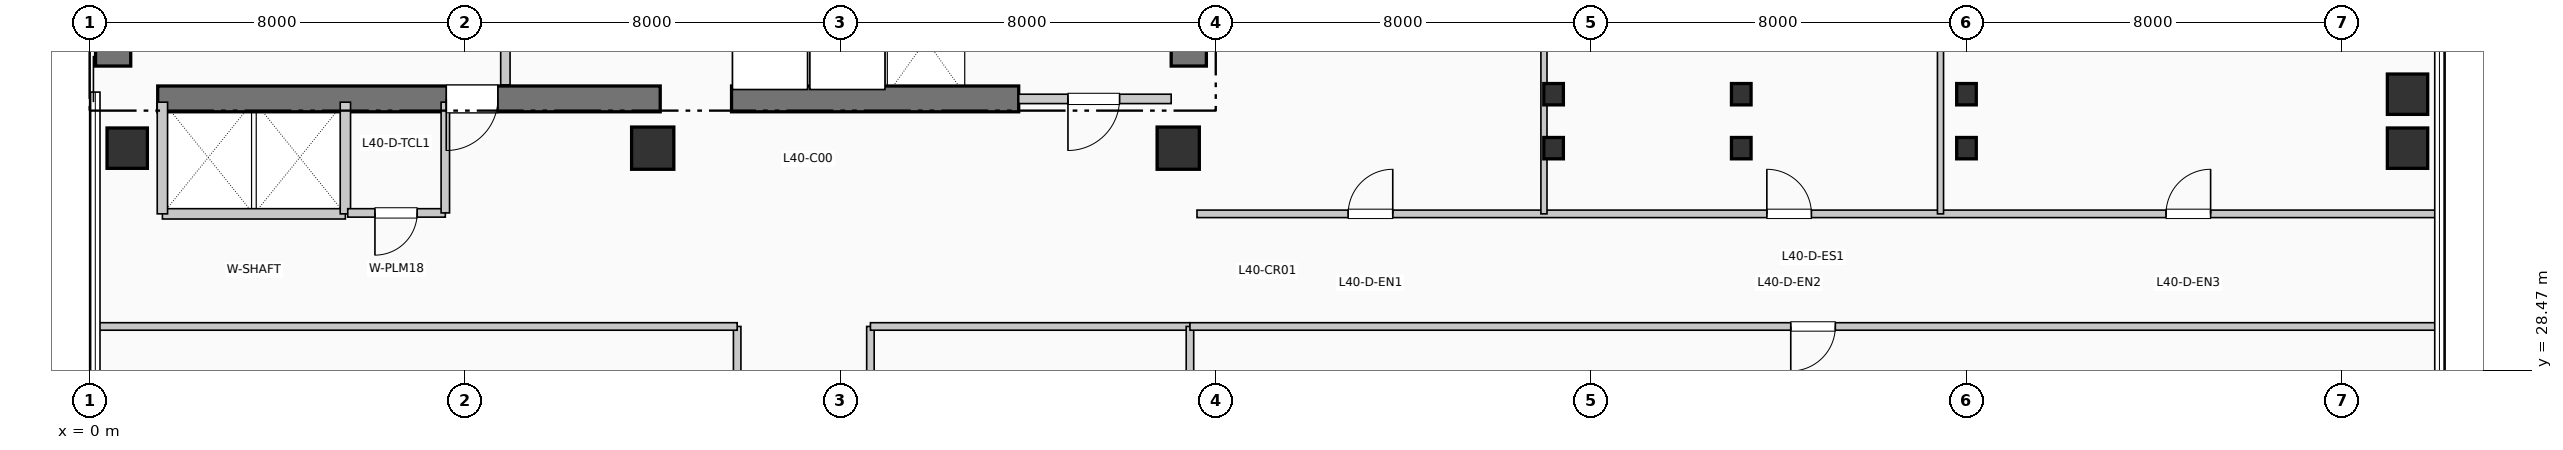
"""IFC4 building model, lengths in metres.
Left out: names, types, materials, properties, quantities, classifications, styles, units other than length and angle.
Written with IfcOpenShell. Run it as: python <this file> out.ifc"""

import sys

from ifc_helpers import new_model, si_unit, direction, frame, frame_2d, origin, origin_2d, place, context, subcontext, project, spatial, rectangle, i_section, extrude, element, fill, save


model = new_model("IFC4")
c1 = context("Model", 3, precision=1e-05, world=origin(), true_north=direction((0.0, 1.0)))
c2 = subcontext(c1, "Body", "Model", "MODEL_VIEW")
j1 = project(units=[si_unit("LENGTHUNIT", "METRE"), si_unit("PLANEANGLEUNIT", "RADIAN")], contexts=[c1])
p1 = place(None, origin())
s1 = spatial("IfcSite", under=j1, at=p1, CompositionType="ELEMENT")
p2 = place(p1, origin())
s2 = spatial("IfcBuilding", under=s1, at=p2, CompositionType="ELEMENT")
p3 = place(p2, frame((0.0, 0.0, 166.65)))
s3 = spatial("IfcBuildingStorey", under=s2, at=p3, CompositionType="ELEMENT", Elevation=166.65)
p4 = place(p3, frame((0.5, 34.95, 0.0), z_axis=(0.0, 0.0, 1.0), x_axis=(0.0, 1.0, 0.0)))
e1 = element("IfcWall", 1, at=p4, inside=s3, PredefinedType="SHEAR", context=c2, shape_type="SweptSolid", body=[
    extrude(rectangle(XDim=7.9, YDim=0.75, at=frame_2d((3.95, 0.0))), origin(), (0.0, 0.0, 1.0), 3.96),
])
p5 = place(p3, frame((23.425, 34.95, 0.0), z_axis=(0.0, 0.0, 1.0), x_axis=(0.0, 1.0, 0.0)))
e2 = element("IfcWall", 2, at=p5, inside=s3, PredefinedType="SHEAR", context=c2, shape_type="SweptSolid", body=[
    extrude(rectangle(XDim=10.64, YDim=0.75, at=frame_2d((5.32, 0.0))), origin(), (0.0, 0.0, 1.0), 3.96),
])
p6 = place(p3, frame((1.45, 34.25, 0.0), z_axis=(0.0, 0.0, 1.0), x_axis=(1.0, 0.0, 0.0)))
e3 = element("IfcWall", 3, at=p6, inside=s3, PredefinedType="SHEAR", context=c2, shape_type="SweptSolid", body=[
    extrude(rectangle(XDim=10.71, YDim=0.55, at=frame_2d((5.355, 0.0))), origin(), (0.0, 0.0, 1.0), 3.96),
])
p7 = place(p6, frame((7.25, 0.0, 0.0), z_axis=(0.0, 0.0, 1.0), x_axis=(-1.0, 0.0, 0.0)))
e4 = element("IfcOpeningElement", 4, at=p7, cuts=e3, PredefinedType="OPENING", context=c2, shape_type="SweptSolid", body=[
    extrude(rectangle(XDim=1.1, YDim=2.15, at=frame_2d((0.55, 1.075))), frame((0.0, 0.285, 0.0), z_axis=(0.0, -1.0, 0.0), x_axis=(1.0, 0.0, 0.0)), (0.0, 0.0, 1.0), 0.57),
])
p8 = place(p3, frame((13.68, 34.25, 0.0), z_axis=(0.0, 0.0, 1.0), x_axis=(1.0, 0.0, 0.0)))
e5 = element("IfcWall", 5, at=p8, inside=s3, PredefinedType="SHEAR", context=c2, shape_type="SweptSolid", body=[
    extrude(rectangle(XDim=6.12, YDim=0.55, at=frame_2d((3.06, 0.0))), origin(), (0.0, 0.0, 1.0), 3.96),
])
p9 = place(p3, frame((0.8, 33.2, 0.0), z_axis=(0.0, 0.0, 1.0), x_axis=(1.0, 0.0, 0.0)))
e6 = element("IfcColumn", 6, at=p9, inside=s3, PredefinedType="COLUMN", context=c2, shape_type="SweptSolid", body=[
    extrude(rectangle(XDim=0.86, YDim=0.86, at=origin_2d()), origin(), (0.0, 0.0, 1.0), 3.96),
])
for number, where, z_axis, x_axis in (
    (7, (12.0, 33.2, 0.0), (0.0, 0.0, 1.0), (1.0, 0.0, 0.0)),
    (8, (23.2, 33.2, 0.0), (0.0, 0.0, 1.0), (1.0, 0.0, 0.0)),
):
    element("IfcColumn", number, at=place(p3, frame(where, z_axis=z_axis, x_axis=x_axis)), inside=s3, PredefinedType="COLUMN", context=c2, shape_type="SweptSolid", body=[
        extrude(rectangle(XDim=0.9, YDim=0.9, at=origin_2d()), origin(), (0.0, 0.0, 1.0), 3.96),
    ])
for number, where, z_axis, x_axis in (
    (9, (31.2, 33.2, 0.0), (0.0, 0.0, 1.0), (1.0, 0.0, 0.0)),
    (10, (31.2, 34.35, 0.0), (0.0, 0.0, 1.0), (1.0, 0.0, 0.0)),
    (11, (35.2, 33.2, 0.0), (0.0, 0.0, 1.0), (1.0, 0.0, 0.0)),
    (12, (35.2, 34.35, 0.0), (0.0, 0.0, 1.0), (1.0, 0.0, 0.0)),
    (13, (40.0, 33.2, 0.0), (0.0, 0.0, 1.0), (1.0, 0.0, 0.0)),
    (14, (40.0, 34.35, 0.0), (0.0, 0.0, 1.0), (1.0, 0.0, 0.0)),
):
    element("IfcColumn", number, at=place(p3, frame(where, z_axis=z_axis, x_axis=x_axis)), inside=s3, PredefinedType="COLUMN", context=c2, shape_type="SweptSolid", body=[
        extrude(i_section(OverallWidth=0.418, OverallDepth=0.455, WebThickness=0.032, FlangeThickness=0.051, at=origin_2d()), origin(), (0.0, 0.0, 1.0), 3.96),
    ])
for number, where, z_axis, x_axis in (
    (15, (49.4, 33.2, 0.0), (0.0, 0.0, 1.0), (1.0, 0.0, 0.0)),
    (16, (49.4, 34.35, 0.0), (0.0, 0.0, 1.0), (1.0, 0.0, 0.0)),
):
    element("IfcColumn", number, at=place(p3, frame(where, z_axis=z_axis, x_axis=x_axis)), inside=s3, PredefinedType="COLUMN", context=c2, shape_type="SweptSolid", body=[
        extrude(rectangle(XDim=0.86, YDim=0.86, at=origin_2d()), origin(), (0.0, 0.0, 1.0), 3.96),
    ])
p10 = place(p3, frame((8.86, 34.55, 0.0), z_axis=(0.0, 0.0, 1.0), x_axis=(0.0, 1.0, 0.0)))
e17 = element("IfcWall", 17, at=p10, inside=s3, PredefinedType="PARTITIONING", context=c2, shape_type="SweptSolid", body=[
    extrude(rectangle(XDim=2.5, YDim=0.2, at=frame_2d((1.25, 0.0))), origin(), (0.0, 0.0, 1.0), 3.71),
])
p11 = place(p3, frame((19.8, 34.25, 0.0), z_axis=(0.0, 0.0, 1.0), x_axis=(1.0, 0.0, 0.0)))
e18 = element("IfcWall", 18, at=p11, inside=s3, PredefinedType="PARTITIONING", context=c2, shape_type="SweptSolid", body=[
    extrude(rectangle(XDim=3.25, YDim=0.2, at=frame_2d((1.625, 0.0))), origin(), (0.0, 0.0, 1.0), 3.71),
])
p12 = place(p11, frame((2.15, 0.0, 0.0), z_axis=(0.0, 0.0, 1.0), x_axis=(-1.0, 0.0, 0.0)))
e19 = element("IfcOpeningElement", 19, at=p12, cuts=e18, PredefinedType="OPENING", context=c2, shape_type="SweptSolid", body=[
    extrude(rectangle(XDim=1.1, YDim=2.15, at=frame_2d((0.55, 1.075))), frame((0.0, 0.11, 0.0), z_axis=(0.0, -1.0, 0.0), x_axis=(1.0, 0.0, 0.0)), (0.0, 0.0, 1.0), 0.22),
])
p13 = place(p3, frame((1.55, 31.8, 0.0), z_axis=(0.0, 0.0, 1.0), x_axis=(1.0, 0.0, 0.0)))
e20 = element("IfcWall", 20, at=p13, inside=s3, PredefinedType="PARTITIONING", context=c2, shape_type="SweptSolid", body=[
    extrude(rectangle(XDim=3.9, YDim=0.22, at=frame_2d((1.95, 0.0))), origin(), (0.0, 0.0, 1.0), 3.71),
])
for number, where, z_axis, x_axis in (
    (21, (1.55, 31.8, 0.0), (0.0, 0.0, 1.0), (0.0, 1.0, 0.0)),
    (22, (5.45, 31.8, 0.0), (0.0, 0.0, 1.0), (0.0, 1.0, 0.0)),
):
    element("IfcWall", number, at=place(p3, frame(where, z_axis=z_axis, x_axis=x_axis)), inside=s3, PredefinedType="PARTITIONING", context=c2, shape_type="SweptSolid", body=[
        extrude(rectangle(XDim=2.38, YDim=0.22, at=frame_2d((1.19, 0.0))), origin(), (0.0, 0.0, 1.0), 3.71),
    ])
p14 = place(p3, frame((5.5, 31.82, 0.0), z_axis=(0.0, 0.0, 1.0), x_axis=(1.0, 0.0, 0.0)))
e23 = element("IfcWall", 23, at=p14, inside=s3, PredefinedType="PLUMBINGWALL", context=c2, shape_type="SweptSolid", body=[
    extrude(rectangle(XDim=2.08, YDim=0.18, at=frame_2d((1.04, 0.0))), origin(), (0.0, 0.0, 1.0), 3.71),
])
p15 = place(p14, frame((1.48, 0.0, 0.0), z_axis=(0.0, 0.0, 1.0), x_axis=(-1.0, 0.0, 0.0)))
e24 = element("IfcOpeningElement", 24, at=p15, cuts=e23, PredefinedType="OPENING", context=c2, shape_type="SweptSolid", body=[
    extrude(rectangle(XDim=0.9, YDim=2.1, at=frame_2d((0.45, 1.05))), frame((0.0, 0.1, 0.0), z_axis=(0.0, -1.0, 0.0), x_axis=(1.0, 0.0, 0.0)), (0.0, 0.0, 1.0), 0.2),
])
p16 = place(p3, frame((7.58, 31.82, 0.0), z_axis=(0.0, 0.0, 1.0), x_axis=(0.0, 1.0, 0.0)))
e25 = element("IfcWall", 25, at=p16, inside=s3, PredefinedType="PLUMBINGWALL", context=c2, shape_type="SweptSolid", body=[
    extrude(rectangle(XDim=2.36, YDim=0.18, at=frame_2d((1.18, 0.0))), origin(), (0.0, 0.0, 1.0), 3.71),
])
p17 = place(p3, frame((13.8, 7.2, 0.0), z_axis=(0.0, 0.0, 1.0), x_axis=(0.0, 1.0, 0.0)))
e26 = element("IfcWall", 26, at=p17, inside=s3, PredefinedType="PARTITIONING", context=c2, shape_type="SweptSolid", body=[
    extrude(rectangle(XDim=22.2, YDim=0.16, at=frame_2d((11.1, 0.0))), origin(), (0.0, 0.0, 1.0), 3.71),
])
p18 = place(p17, frame((4.36, 0.0, 0.0), z_axis=(0.0, 0.0, 1.0), x_axis=(-1.0, 0.0, 0.0)))
e27 = element("IfcOpeningElement", 27, at=p18, cuts=e26, PredefinedType="OPENING", context=c2, shape_type="SweptSolid", body=[
    extrude(rectangle(XDim=0.95, YDim=2.15, at=frame_2d((0.475, 1.075))), frame((0.0, 0.09, 0.0), z_axis=(0.0, -1.0, 0.0), x_axis=(1.0, 0.0, 0.0)), (0.0, 0.0, 1.0), 0.18),
])
p19 = place(p17, frame((12.13, 0.0, 0.0), z_axis=(0.0, 0.0, 1.0), x_axis=(-1.0, 0.0, 0.0)))
e28 = element("IfcOpeningElement", 28, at=p19, cuts=e26, PredefinedType="OPENING", context=c2, shape_type="SweptSolid", body=[
    extrude(rectangle(XDim=0.95, YDim=2.15, at=frame_2d((0.475, 1.075))), frame((0.0, 0.09, 0.0), z_axis=(0.0, -1.0, 0.0), x_axis=(1.0, 0.0, 0.0)), (0.0, 0.0, 1.0), 0.18),
])
p20 = place(p17, frame((19.345, 0.0, 0.0), z_axis=(0.0, 0.0, 1.0), x_axis=(-1.0, 0.0, 0.0)))
e29 = element("IfcOpeningElement", 29, at=p20, cuts=e26, PredefinedType="OPENING", context=c2, shape_type="SweptSolid", body=[
    extrude(rectangle(XDim=0.95, YDim=2.15, at=frame_2d((0.475, 1.075))), frame((0.0, 0.09, 0.0), z_axis=(0.0, -1.0, 0.0), x_axis=(1.0, 0.0, 0.0)), (0.0, 0.0, 1.0), 0.18),
])
p21 = place(p3, frame((16.64, 7.2, 0.0), z_axis=(0.0, 0.0, 1.0), x_axis=(0.0, 1.0, 0.0)))
e30 = element("IfcWall", 30, at=p21, inside=s3, PredefinedType="PARTITIONING", context=c2, shape_type="SweptSolid", body=[
    extrude(rectangle(XDim=22.2, YDim=0.16, at=frame_2d((11.1, 0.0))), origin(), (0.0, 0.0, 1.0), 3.71),
])
p22 = place(p21, frame((10.625, 0.0, 0.0)))
e31 = element("IfcOpeningElement", 31, at=p22, cuts=e30, PredefinedType="OPENING", context=c2, shape_type="SweptSolid", body=[
    extrude(rectangle(XDim=0.95, YDim=2.15, at=frame_2d((0.475, 1.075))), frame((0.0, 0.09, 0.0), z_axis=(0.0, -1.0, 0.0), x_axis=(1.0, 0.0, 0.0)), (0.0, 0.0, 1.0), 0.18),
])
p23 = place(p3, frame((0.19, 29.4, 0.0), z_axis=(0.0, 0.0, 1.0), x_axis=(1.0, 0.0, 0.0)))
e32 = element("IfcWall", 32, at=p23, inside=s3, PredefinedType="PARTITIONING", context=c2, shape_type="SweptSolid", body=[
    extrude(rectangle(XDim=13.61, YDim=0.16, at=frame_2d((6.805, 0.0))), origin(), (0.0, 0.0, 1.0), 3.365),
])
p24 = place(p3, frame((16.64, 29.4, 0.0), z_axis=(0.0, 0.0, 1.0), x_axis=(1.0, 0.0, 0.0)))
e33 = element("IfcWall", 33, at=p24, inside=s3, PredefinedType="PARTITIONING", context=c2, shape_type="SweptSolid", body=[
    extrude(rectangle(XDim=6.81, YDim=0.16, at=frame_2d((3.405, 0.0))), origin(), (0.0, 0.0, 1.0), 3.71),
])
p25 = place(p3, frame((23.45, 0.19, 0.0), z_axis=(0.0, 0.0, 1.0), x_axis=(0.0, 1.0, 0.0)))
e34 = element("IfcWall", 34, at=p25, inside=s3, PredefinedType="PARTITIONING", context=c2, shape_type="SweptSolid", body=[
    extrude(rectangle(XDim=29.21, YDim=0.16, at=frame_2d((14.605, 0.0))), origin(), (0.0, 0.0, 1.0), 3.045),
])
p26 = place(p3, frame((23.45, 29.4, 0.0), z_axis=(0.0, 0.0, 1.0), x_axis=(1.0, 0.0, 0.0)))
e35 = element("IfcWall", 35, at=p26, inside=s3, PredefinedType="PARTITIONING", context=c2, shape_type="SweptSolid", body=[
    extrude(rectangle(XDim=26.56, YDim=0.16, at=frame_2d((13.28, 0.0))), origin(), (0.0, 0.0, 1.0), 3.365),
])
p27 = place(p26, frame((13.755, 0.0, 0.0), z_axis=(0.0, 0.0, 1.0), x_axis=(-1.0, 0.0, 0.0)))
e36 = element("IfcOpeningElement", 36, at=p27, cuts=e35, PredefinedType="OPENING", context=c2, shape_type="SweptSolid", body=[
    extrude(rectangle(XDim=0.95, YDim=2.15, at=frame_2d((0.475, 1.075))), frame((0.0, 0.09, 0.0), z_axis=(0.0, -1.0, 0.0), x_axis=(1.0, 0.0, 0.0)), (0.0, 0.0, 1.0), 0.18),
])
p28 = place(p3, frame((23.6, 31.8, 0.0), z_axis=(0.0, 0.0, 1.0), x_axis=(1.0, 0.0, 0.0)))
e37 = element("IfcWall", 37, at=p28, inside=s3, PredefinedType="PARTITIONING", context=c2, shape_type="SweptSolid", body=[
    extrude(rectangle(XDim=26.41, YDim=0.16, at=frame_2d((13.205, 0.0))), origin(), (0.0, 0.0, 1.0), 3.71),
])
p29 = place(p28, frame((3.222, 0.0, 0.0)))
e38 = element("IfcOpeningElement", 38, at=p29, cuts=e37, PredefinedType="OPENING", context=c2, shape_type="SweptSolid", body=[
    extrude(rectangle(XDim=0.95, YDim=2.15, at=frame_2d((0.475, 1.075))), frame((0.0, 0.09, 0.0), z_axis=(0.0, -1.0, 0.0), x_axis=(1.0, 0.0, 0.0)), (0.0, 0.0, 1.0), 0.18),
])
p30 = place(p28, frame((12.146, 0.0, 0.0)))
e39 = element("IfcOpeningElement", 39, at=p30, cuts=e37, PredefinedType="OPENING", context=c2, shape_type="SweptSolid", body=[
    extrude(rectangle(XDim=0.95, YDim=2.15, at=frame_2d((0.475, 1.075))), frame((0.0, 0.09, 0.0), z_axis=(0.0, -1.0, 0.0), x_axis=(1.0, 0.0, 0.0)), (0.0, 0.0, 1.0), 0.18),
])
p31 = place(p28, frame((20.653, 0.0, 0.0)))
e40 = element("IfcOpeningElement", 40, at=p31, cuts=e37, PredefinedType="OPENING", context=c2, shape_type="SweptSolid", body=[
    extrude(rectangle(XDim=0.95, YDim=2.15, at=frame_2d((0.475, 1.075))), frame((0.0, 0.09, 0.0), z_axis=(0.0, -1.0, 0.0), x_axis=(1.0, 0.0, 0.0)), (0.0, 0.0, 1.0), 0.18),
])
p32 = place(p3, frame((30.995, 31.8, 0.0), z_axis=(0.0, 0.0, 1.0), x_axis=(0.0, 1.0, 0.0)))
e41 = element("IfcWall", 41, at=p32, inside=s3, PredefinedType="PARTITIONING", context=c2, shape_type="SweptSolid", body=[
    extrude(rectangle(XDim=14.01, YDim=0.13, at=frame_2d((7.005, 0.0))), origin(), (0.0, 0.0, 1.0), 3.045),
])
p33 = place(p3, frame((39.446, 31.8, 0.0), z_axis=(0.0, 0.0, 1.0), x_axis=(0.0, 1.0, 0.0)))
e42 = element("IfcWall", 42, at=p33, inside=s3, PredefinedType="PARTITIONING", context=c2, shape_type="SweptSolid", body=[
    extrude(rectangle(XDim=14.01, YDim=0.13, at=frame_2d((7.005, 0.0))), origin(), (0.0, 0.0, 1.0), 3.71),
])
p34 = place(p7, origin())
e43 = element("IfcDoor", 43, at=p34, inside=s3, OperationType="SINGLE_SWING_LEFT", PredefinedType="DOOR", context=c2, shape_type="SweptSolid", body=[
    extrude(rectangle(XDim=1.1, YDim=2.15, at=frame_2d((0.55, 1.075))), frame((0.0, 0.025, 0.0), z_axis=(0.0, -1.0, 0.0), x_axis=(1.0, 0.0, 0.0)), (0.0, 0.0, 1.0), 0.05),
])
fill(e4, e43)
p35 = place(p12, origin())
e44 = element("IfcDoor", 44, at=p35, inside=s3, OperationType="SINGLE_SWING_LEFT", PredefinedType="DOOR", context=c2, shape_type="SweptSolid", body=[
    extrude(rectangle(XDim=1.1, YDim=2.15, at=frame_2d((0.55, 1.075))), frame((0.0, 0.025, 0.0), z_axis=(0.0, -1.0, 0.0), x_axis=(1.0, 0.0, 0.0)), (0.0, 0.0, 1.0), 0.05),
])
fill(e19, e44)
p36 = place(p15, origin())
e45 = element("IfcDoor", 45, at=p36, inside=s3, OperationType="SINGLE_SWING_LEFT", PredefinedType="DOOR", context=c2, shape_type="SweptSolid", body=[
    extrude(rectangle(XDim=0.9, YDim=2.1, at=frame_2d((0.45, 1.05))), frame((0.0, 0.025, 0.0), z_axis=(0.0, -1.0, 0.0), x_axis=(1.0, 0.0, 0.0)), (0.0, 0.0, 1.0), 0.05),
])
fill(e24, e45)
p37 = place(p27, origin())
e46 = element("IfcDoor", 46, at=p37, inside=s3, OperationType="SINGLE_SWING_LEFT", PredefinedType="DOOR", context=c2, shape_type="SweptSolid", body=[
    extrude(rectangle(XDim=0.95, YDim=2.15, at=frame_2d((0.475, 1.075))), frame((0.0, 0.025, 0.0), z_axis=(0.0, -1.0, 0.0), x_axis=(1.0, 0.0, 0.0)), (0.0, 0.0, 1.0), 0.05),
])
fill(e36, e46)
p38 = place(p29, origin())
e47 = element("IfcDoor", 47, at=p38, inside=s3, OperationType="SINGLE_SWING_RIGHT", PredefinedType="DOOR", context=c2, shape_type="SweptSolid", body=[
    extrude(rectangle(XDim=0.95, YDim=2.15, at=frame_2d((0.475, 1.075))), frame((0.0, 0.025, 0.0), z_axis=(0.0, -1.0, 0.0), x_axis=(1.0, 0.0, 0.0)), (0.0, 0.0, 1.0), 0.05),
])
fill(e38, e47)
p39 = place(p30, origin())
e48 = element("IfcDoor", 48, at=p39, inside=s3, OperationType="SINGLE_SWING_LEFT", PredefinedType="DOOR", context=c2, shape_type="SweptSolid", body=[
    extrude(rectangle(XDim=0.95, YDim=2.15, at=frame_2d((0.475, 1.075))), frame((0.0, 0.025, 0.0), z_axis=(0.0, -1.0, 0.0), x_axis=(1.0, 0.0, 0.0)), (0.0, 0.0, 1.0), 0.05),
])
fill(e39, e48)
p40 = place(p31, origin())
e49 = element("IfcDoor", 49, at=p40, inside=s3, OperationType="SINGLE_SWING_RIGHT", PredefinedType="DOOR", context=c2, shape_type="SweptSolid", body=[
    extrude(rectangle(XDim=0.95, YDim=2.15, at=frame_2d((0.475, 1.075))), frame((0.0, 0.025, 0.0), z_axis=(0.0, -1.0, 0.0), x_axis=(1.0, 0.0, 0.0)), (0.0, 0.0, 1.0), 0.05),
])
fill(e40, e49)
save(model, sys.argv[1])
